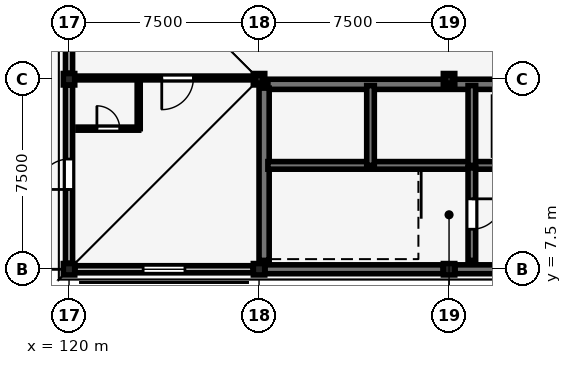
"""IFC4 building model, lengths in metres.
Left out: names, types, materials, properties, quantities, classifications, styles, units other than length and angle.
Written with IfcOpenShell. Run it as: python <this file> out.ifc"""

import sys

from ifc_helpers import new_model, si_unit, direction, frame, frame_2d, origin, origin_2d, place, context, subcontext, project, spatial, rectangle, i_section, extrude, element, fill, save


model = new_model("IFC4")
c1 = context("Model", 3, precision=1e-05, world=origin(), true_north=direction((0.0, 1.0)))
c2 = subcontext(c1, "Body", "Model", "MODEL_VIEW")
j1 = project(units=[si_unit("LENGTHUNIT", "METRE"), si_unit("PLANEANGLEUNIT", "RADIAN")], contexts=[c1])
p1 = place(None, origin())
s1 = spatial("IfcSite", under=j1, at=p1, CompositionType="ELEMENT")
p2 = place(p1, origin())
s2 = spatial("IfcBuilding", under=s1, at=p2, CompositionType="ELEMENT")
p3 = place(p2, frame((0.0, 0.0, 21.9)))
s3 = spatial("IfcBuildingStorey", under=s2, at=p3, CompositionType="ELEMENT", Elevation=21.9)
for number, where, z_axis, x_axis in (
    (1, (120.0, 7.5, 0.0), (0.0, 0.0, 1.0), (1.0, 0.0, 0.0)),
    (2, (120.0, 15.0, 0.0), (0.0, 0.0, 1.0), (1.0, 0.0, 0.0)),
    (3, (127.5, 7.5, 0.0), (0.0, 0.0, 1.0), (1.0, 0.0, 0.0)),
    (4, (127.5, 15.0, 0.0), (0.0, 0.0, 1.0), (1.0, 0.0, 0.0)),
    (5, (135.0, 7.5, 0.0), (0.0, 0.0, 1.0), (1.0, 0.0, 0.0)),
    (6, (135.0, 15.0, 0.0), (0.0, 0.0, 1.0), (1.0, 0.0, 0.0)),
):
    element("IfcColumn", number, at=place(p3, frame(where, z_axis=z_axis, x_axis=x_axis)), inside=s3, PredefinedType="COLUMN", context=c2, shape_type="SweptSolid", body=[
        extrude(rectangle(XDim=0.45, YDim=0.45, at=origin_2d()), origin(), (0.0, 0.0, 1.0), 4.05),
    ])
for number, where, z_axis, x_axis in (
    (7, (127.5, 15.0, 4.05), (0.0, 0.0, 1.0), (1.0, 0.0, 0.0)),
    (8, (135.0, 15.0, 4.05), (0.0, 0.0, 1.0), (1.0, 0.0, 0.0)),
):
    element("IfcColumn", number, at=place(p3, frame(where, z_axis=z_axis, x_axis=x_axis)), inside=s3, PredefinedType="COLUMN", context=c2, shape_type="SweptSolid", body=[
        extrude(i_section(OverallWidth=0.3, OverallDepth=0.3, WebThickness=0.011, FlangeThickness=0.019, FilletRadius=0.027, at=origin_2d()), origin(), (0.0, 0.0, 1.0), 1.97),
    ])
p4 = place(p3, frame((127.265, 7.5, 0.0), z_axis=(0.0, 0.0, 1.0), x_axis=(-1.0, 0.0, 0.0)))
e9 = element("IfcWall", 9, at=p4, inside=s3, PredefinedType="STANDARD", context=c2, shape_type="SweptSolid", body=[
    extrude(rectangle(XDim=7.03, YDim=0.28, at=frame_2d((3.515, 0.0))), origin(), (0.0, 0.0, 1.0), 3.77),
])
p5 = place(p4, frame((2.69, 0.0, 0.85)))
e10 = element("IfcOpeningElement", 10, at=p5, cuts=e9, PredefinedType="OPENING", context=c2, shape_type="SweptSolid", body=[
    extrude(rectangle(XDim=1.65, YDim=2.25, at=frame_2d((0.825, 1.125))), frame((0.0, 0.15, 0.0), z_axis=(0.0, -1.0, 0.0), x_axis=(1.0, 0.0, 0.0)), (0.0, 0.0, 1.0), 0.3),
])
p6 = place(p3, frame((120.0, 7.735, 0.0), z_axis=(0.0, 0.0, 1.0), x_axis=(0.0, 1.0, 0.0)))
e11 = element("IfcWall", 11, at=p6, inside=s3, PredefinedType="STANDARD", context=c2, shape_type="SweptSolid", body=[
    extrude(rectangle(XDim=7.03, YDim=0.28, at=frame_2d((3.515, 0.0))), origin(), (0.0, 0.0, 1.0), 3.77),
])
p7 = place(p6, frame((2.915, 0.0, 0.0)))
e12 = element("IfcOpeningElement", 12, at=p7, cuts=e11, PredefinedType="OPENING", context=c2, shape_type="SweptSolid", body=[
    extrude(rectangle(XDim=1.2, YDim=2.3, at=frame_2d((0.6, 1.15))), frame((0.0, 0.15, 0.0), z_axis=(0.0, -1.0, 0.0), x_axis=(1.0, 0.0, 0.0)), (0.0, 0.0, 1.0), 0.3),
])
p8 = place(p3, frame((120.0, 15.235, 0.0), z_axis=(0.0, 0.0, 1.0), x_axis=(0.0, 1.0, 0.0)))
e13 = element("IfcWall", 13, at=p8, inside=s3, PredefinedType="STANDARD", context=c2, shape_type="SweptSolid", body=[
    extrude(rectangle(XDim=7.115, YDim=0.28, at=frame_2d((3.558, 0.0))), origin(), (0.0, 0.0, 1.0), 3.77),
])
p9 = place(p8, frame((2.958, 0.0, 0.0)))
e14 = element("IfcOpeningElement", 14, at=p9, cuts=e13, PredefinedType="OPENING", context=c2, shape_type="SweptSolid", body=[
    extrude(rectangle(XDim=1.2, YDim=2.3, at=frame_2d((0.6, 1.15))), frame((0.0, 0.15, 0.0), z_axis=(0.0, -1.0, 0.0), x_axis=(1.0, 0.0, 0.0)), (0.0, 0.0, 1.0), 0.3),
])
for number, where, z_axis, x_axis in (
    (15, (134.765, 7.5, 0.0), (0.0, 0.0, 1.0), (-1.0, 0.0, 0.0)),
    (16, (142.265, 7.5, 0.0), (0.0, 0.0, 1.0), (-1.0, 0.0, 0.0)),
):
    element("IfcWall", number, at=place(p3, frame(where, z_axis=z_axis, x_axis=x_axis)), inside=s3, PredefinedType="SHEAR", context=c2, shape_type="SweptSolid", body=[
        extrude(rectangle(XDim=7.03, YDim=0.35, at=frame_2d((3.515, 0.0))), origin(), (0.0, 0.0, 1.0), 3.77),
    ])
p10 = place(p3, frame((127.85, 14.8, 0.0), z_axis=(0.0, 0.0, 1.0), x_axis=(1.0, 0.0, 0.0)))
e17 = element("IfcWall", 17, at=p10, inside=s3, PredefinedType="SHEAR", context=c2, shape_type="SweptSolid", body=[
    extrude(rectangle(XDim=14.3, YDim=0.4, at=frame_2d((7.15, 0.0))), origin(), (0.0, 0.0, 1.0), 3.77),
])
p11 = place(p3, frame((127.7, 7.85, 0.0), z_axis=(0.0, 0.0, 1.0), x_axis=(0.0, 1.0, 0.0)))
e18 = element("IfcWall", 18, at=p11, inside=s3, PredefinedType="SHEAR", context=c2, shape_type="SweptSolid", body=[
    extrude(rectangle(XDim=6.8, YDim=0.4, at=frame_2d((3.4, 0.0))), origin(), (0.0, 0.0, 1.0), 3.77),
])
p12 = place(p3, frame((127.85, 11.6, 0.0), z_axis=(0.0, 0.0, 1.0), x_axis=(1.0, 0.0, 0.0)))
e19 = element("IfcWall", 19, at=p12, inside=s3, PredefinedType="SHEAR", context=c2, shape_type="SweptSolid", body=[
    extrude(rectangle(XDim=8.05, YDim=0.3, at=frame_2d((4.025, 0.0))), origin(), (0.0, 0.0, 1.0), 3.77),
])
p13 = place(p3, frame((135.9, 11.6, 0.0), z_axis=(0.0, 0.0, 1.0), x_axis=(1.0, 0.0, 0.0)))
e20 = element("IfcWall", 20, at=p13, inside=s3, PredefinedType="SHEAR", context=c2, shape_type="SweptSolid", body=[
    extrude(rectangle(XDim=6.25, YDim=0.3, at=frame_2d((3.125, 0.0))), origin(), (0.0, 0.0, 1.0), 3.77),
])
p14 = place(p13, frame((0.95, 0.0, 0.0)))
e21 = element("IfcOpeningElement", 21, at=p14, cuts=e20, PredefinedType="OPENING", context=c2, shape_type="SweptSolid", body=[
    extrude(rectangle(XDim=1.3, YDim=2.2, at=frame_2d((0.65, 1.1))), frame((0.0, 0.16, 0.0), z_axis=(0.0, -1.0, 0.0), x_axis=(1.0, 0.0, 0.0)), (0.0, 0.0, 1.0), 0.32),
])
p15 = place(p13, frame((4.15, 0.0, 0.0)))
e22 = element("IfcOpeningElement", 22, at=p15, cuts=e20, PredefinedType="OPENING", context=c2, shape_type="SweptSolid", body=[
    extrude(rectangle(XDim=1.3, YDim=2.2, at=frame_2d((0.65, 1.1))), frame((0.0, 0.16, 0.0), z_axis=(0.0, -1.0, 0.0), x_axis=(1.0, 0.0, 0.0)), (0.0, 0.0, 1.0), 0.32),
])
p16 = place(p3, frame((135.9, 11.5, 0.0), z_axis=(0.0, 0.0, 1.0), x_axis=(0.0, -1.0, 0.0)))
e23 = element("IfcWall", 23, at=p16, inside=s3, PredefinedType="SHEAR", context=c2, shape_type="SweptSolid", body=[
    extrude(rectangle(XDim=3.65, YDim=0.3, at=frame_2d((1.825, 0.0))), origin(), (0.0, 0.0, 1.0), 3.77),
])
p17 = place(p16, frame((1.22, 0.0, 0.0)))
e24 = element("IfcOpeningElement", 24, at=p17, cuts=e23, PredefinedType="OPENING", context=c2, shape_type="SweptSolid", body=[
    extrude(rectangle(XDim=1.2, YDim=2.25, at=frame_2d((0.6, 1.125))), frame((0.0, 0.16, 0.0), z_axis=(0.0, -1.0, 0.0), x_axis=(1.0, 0.0, 0.0)), (0.0, 0.0, 1.0), 0.32),
])
for number, where, z_axis, x_axis in (
    (25, (131.9, 11.6, 0.0), (0.0, 0.0, 1.0), (0.0, 1.0, 0.0)),
    (26, (135.9, 11.6, 0.0), (0.0, 0.0, 1.0), (0.0, 1.0, 0.0)),
):
    element("IfcWall", number, at=place(p3, frame(where, z_axis=z_axis, x_axis=x_axis)), inside=s3, PredefinedType="SHEAR", context=c2, shape_type="SweptSolid", body=[
        extrude(rectangle(XDim=3.15, YDim=0.3, at=frame_2d((1.575, 0.0))), origin(), (0.0, 0.0, 1.0), 3.77),
    ])
p18 = place(p3, frame((127.2, 15.05, 0.0), z_axis=(0.0, 0.0, 1.0), x_axis=(-1.0, 0.0, 0.0)))
e27 = element("IfcWall", 27, at=p18, inside=s3, PredefinedType="PARTITIONING", context=c2, shape_type="SweptSolid", body=[
    extrude(rectangle(XDim=6.85, YDim=0.15, at=frame_2d((3.425, 0.0))), origin(), (0.0, 0.0, 1.0), 3.755),
])
p19 = place(p18, frame((2.29, 0.0, 0.0)))
e28 = element("IfcOpeningElement", 28, at=p19, cuts=e27, PredefinedType="OPENING", context=c2, shape_type="SweptSolid", body=[
    extrude(rectangle(XDim=1.25, YDim=2.2, at=frame_2d((0.625, 1.1))), frame((0.0, 0.085, 0.0), z_axis=(0.0, -1.0, 0.0), x_axis=(1.0, 0.0, 0.0)), (0.0, 0.0, 1.0), 0.17),
])
p20 = place(p3, frame((120.35, 13.05, 0.0), z_axis=(0.0, 0.0, 1.0), x_axis=(1.0, 0.0, 0.0)))
e29 = element("IfcWall", 29, at=p20, inside=s3, PredefinedType="PARTITIONING", context=c2, shape_type="SweptSolid", body=[
    extrude(rectangle(XDim=2.4, YDim=0.12, at=frame_2d((1.2, 0.0))), origin(), (0.0, 0.0, 1.0), 3.755),
])
p21 = place(p20, frame((0.75, 0.0, 0.0)))
e30 = element("IfcOpeningElement", 30, at=p21, cuts=e29, PredefinedType="OPENING", context=c2, shape_type="SweptSolid", body=[
    extrude(rectangle(XDim=0.9, YDim=2.1, at=frame_2d((0.45, 1.05))), frame((0.0, 0.07, 0.0), z_axis=(0.0, -1.0, 0.0), x_axis=(1.0, 0.0, 0.0)), (0.0, 0.0, 1.0), 0.14),
])
p22 = place(p3, frame((122.75, 13.05, 0.0), z_axis=(0.0, 0.0, 1.0), x_axis=(0.0, 1.0, 0.0)))
e31 = element("IfcWall", 31, at=p22, inside=s3, PredefinedType="PARTITIONING", context=c2, shape_type="SweptSolid", body=[
    extrude(rectangle(XDim=2.0, YDim=0.12, at=frame_2d((1.0, 0.0))), origin(), (0.0, 0.0, 1.0), 3.755),
])
p23 = place(p5, origin())
e32 = element("IfcWindow", 32, at=p23, inside=s3, PartitioningType="SINGLE_PANEL", PredefinedType="WINDOW", context=c2, shape_type="SweptSolid", body=[
    extrude(rectangle(XDim=1.65, YDim=2.25, at=frame_2d((0.825, 1.125))), frame((0.0, 0.03, 0.0), z_axis=(0.0, -1.0, 0.0), x_axis=(1.0, 0.0, 0.0)), (0.0, 0.0, 1.0), 0.06),
])
fill(e10, e32)
p24 = place(p7, origin())
e33 = element("IfcDoor", 33, at=p24, inside=s3, OperationType="SINGLE_SWING_LEFT", PredefinedType="DOOR", context=c2, shape_type="SweptSolid", body=[
    extrude(rectangle(XDim=1.2, YDim=2.3, at=frame_2d((0.6, 1.15))), frame((0.0, 0.025, 0.0), z_axis=(0.0, -1.0, 0.0), x_axis=(1.0, 0.0, 0.0)), (0.0, 0.0, 1.0), 0.05),
])
fill(e12, e33)
p25 = place(p17, origin())
e34 = element("IfcDoor", 34, at=p25, inside=s3, OperationType="SINGLE_SWING_LEFT", PredefinedType="DOOR", context=c2, shape_type="SweptSolid", body=[
    extrude(rectangle(XDim=1.2, YDim=2.25, at=frame_2d((0.6, 1.125))), frame((0.0, 0.025, 0.0), z_axis=(0.0, -1.0, 0.0), x_axis=(1.0, 0.0, 0.0)), (0.0, 0.0, 1.0), 0.05),
])
fill(e24, e34)
p26 = place(p19, origin())
e35 = element("IfcDoor", 35, at=p26, inside=s3, OperationType="SINGLE_SWING_RIGHT", PredefinedType="DOOR", context=c2, shape_type="SweptSolid", body=[
    extrude(rectangle(XDim=1.25, YDim=2.2, at=frame_2d((0.625, 1.1))), frame((0.0, 0.025, 0.0), z_axis=(0.0, -1.0, 0.0), x_axis=(1.0, 0.0, 0.0)), (0.0, 0.0, 1.0), 0.05),
])
fill(e28, e35)
p27 = place(p21, origin())
e36 = element("IfcDoor", 36, at=p27, inside=s3, OperationType="SINGLE_SWING_LEFT", PredefinedType="DOOR", context=c2, shape_type="SweptSolid", body=[
    extrude(rectangle(XDim=0.9, YDim=2.1, at=frame_2d((0.45, 1.05))), frame((0.0, 0.025, 0.0), z_axis=(0.0, -1.0, 0.0), x_axis=(1.0, 0.0, 0.0)), (0.0, 0.0, 1.0), 0.05),
])
fill(e30, e36)
save(model, sys.argv[1])
